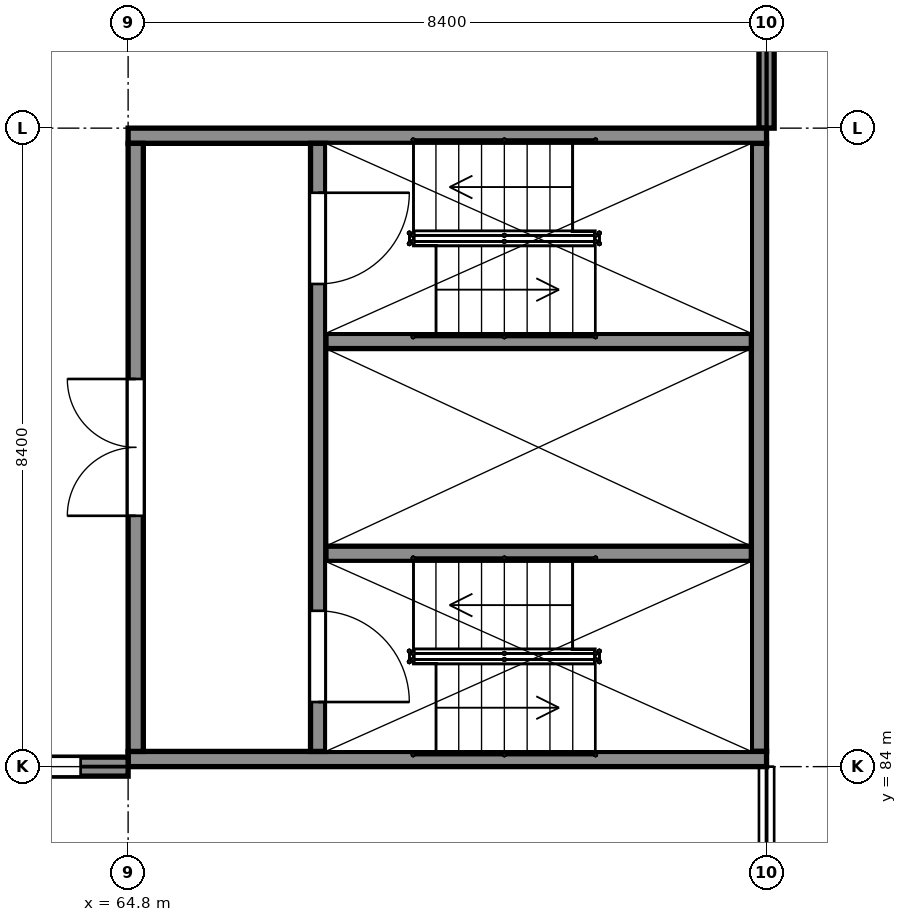
"""IFC4 building model, lengths in metres.
Left out: names, types, materials, properties, quantities, classifications, styles, units other than length and angle.
Written with IfcOpenShell. Run it as: python <this file> out.ifc"""

import sys

from ifc_helpers import new_model, si_unit, direction, frame, frame_2d, origin, place, context, subcontext, project, spatial, rectangle, extrude, element, fill, save


model = new_model("IFC4")
c1 = context("Model", 3, precision=1e-05, world=origin(), true_north=direction((0.0, 1.0)))
c2 = subcontext(c1, "Body", "Model", "MODEL_VIEW")
j1 = project(units=[si_unit("LENGTHUNIT", "METRE"), si_unit("PLANEANGLEUNIT", "RADIAN")], contexts=[c1])
p1 = place(None, origin())
s1 = spatial("IfcSite", under=j1, at=p1, CompositionType="ELEMENT")
p2 = place(p1, origin())
s2 = spatial("IfcBuilding", under=s1, at=p2, CompositionType="ELEMENT")
p3 = place(p2, frame((0.0, 0.0, 10.5)))
s3 = spatial("IfcBuildingStorey", under=s2, at=p3, CompositionType="ELEMENT", Elevation=10.5)
for number, where, z_axis, x_axis in (
    (1, (64.8, 84.1, 0.0), (0.0, 0.0, 1.0), (1.0, 0.0, 0.0)),
    (2, (64.8, 92.3, 0.0), (0.0, 0.0, 1.0), (1.0, 0.0, 0.0)),
):
    element("IfcWall", number, at=place(p3, frame(where, z_axis=z_axis, x_axis=x_axis)), inside=s3, PredefinedType="SHEAR", context=c2, shape_type="SweptSolid", body=[
        extrude(rectangle(XDim=8.4, YDim=0.2, at=frame_2d((4.2, 0.0))), origin(), (0.0, 0.0, 1.0), 9.5),
    ])
p4 = place(p3, frame((64.9, 84.2, 0.0), z_axis=(0.0, 0.0, 1.0), x_axis=(0.0, 1.0, 0.0)))
e3 = element("IfcWall", 3, at=p4, inside=s3, PredefinedType="SHEAR", context=c2, shape_type="SweptSolid", body=[
    extrude(rectangle(XDim=8.0, YDim=0.2, at=frame_2d((4.0, 0.0))), origin(), (0.0, 0.0, 1.0), 9.5),
])
p5 = place(p4, frame((3.1, 0.0, 0.0)))
e4 = element("IfcOpeningElement", 4, at=p5, cuts=e3, PredefinedType="OPENING", context=c2, shape_type="SweptSolid", body=[
    extrude(rectangle(XDim=1.8, YDim=2.1, at=frame_2d((0.9, 1.05))), frame((0.0, 0.11, 0.0), z_axis=(0.0, -1.0, 0.0), x_axis=(1.0, 0.0, 0.0)), (0.0, 0.0, 1.0), 0.22),
])
p6 = place(p3, frame((73.1, 84.2, 0.0), z_axis=(0.0, 0.0, 1.0), x_axis=(0.0, 1.0, 0.0)))
e5 = element("IfcWall", 5, at=p6, inside=s3, PredefinedType="SHEAR", context=c2, shape_type="SweptSolid", body=[
    extrude(rectangle(XDim=8.0, YDim=0.2, at=frame_2d((4.0, 0.0))), origin(), (0.0, 0.0, 1.0), 9.5),
])
p7 = place(p3, frame((67.3, 84.2, 0.0), z_axis=(0.0, 0.0, 1.0), x_axis=(0.0, 1.0, 0.0)))
e6 = element("IfcWall", 6, at=p7, inside=s3, PredefinedType="SHEAR", context=c2, shape_type="SweptSolid", body=[
    extrude(rectangle(XDim=8.0, YDim=0.2, at=frame_2d((4.0, 0.0))), origin(), (0.0, 0.0, 1.0), 9.5),
])
p8 = place(p7, frame((0.65, 0.0, 0.0)))
e7 = element("IfcOpeningElement", 7, at=p8, cuts=e6, PredefinedType="OPENING", context=c2, shape_type="SweptSolid", body=[
    extrude(rectangle(XDim=1.2, YDim=2.1, at=frame_2d((0.6, 1.05))), frame((0.0, 0.11, 0.0), z_axis=(0.0, -1.0, 0.0), x_axis=(1.0, 0.0, 0.0)), (0.0, 0.0, 1.0), 0.22),
])
p9 = place(p7, frame((6.15, 0.0, 0.0)))
e8 = element("IfcOpeningElement", 8, at=p9, cuts=e6, PredefinedType="OPENING", context=c2, shape_type="SweptSolid", body=[
    extrude(rectangle(XDim=1.2, YDim=2.1, at=frame_2d((0.6, 1.05))), frame((0.0, 0.11, 0.0), z_axis=(0.0, -1.0, 0.0), x_axis=(1.0, 0.0, 0.0)), (0.0, 0.0, 1.0), 0.22),
])
for number, where, z_axis, x_axis in (
    (9, (67.4, 86.8, 0.0), (0.0, 0.0, 1.0), (1.0, 0.0, 0.0)),
    (10, (67.4, 89.6, 0.0), (0.0, 0.0, 1.0), (1.0, 0.0, 0.0)),
):
    element("IfcWall", number, at=place(p3, frame(where, z_axis=z_axis, x_axis=x_axis)), inside=s3, PredefinedType="SHEAR", context=c2, shape_type="SweptSolid", body=[
        extrude(rectangle(XDim=5.6, YDim=0.2, at=frame_2d((2.8, 0.0))), origin(), (0.0, 0.0, 1.0), 9.5),
    ])
p10 = place(p3, frame((56.75, 84.0, 0.0), z_axis=(0.0, 0.0, 1.0), x_axis=(1.0, 0.0, 0.0)))
e11 = element("IfcWall", 11, at=p10, inside=s3, PredefinedType="SOLIDWALL", context=c2, shape_type="SweptSolid", body=[
    extrude(rectangle(XDim=8.05, YDim=0.25, at=frame_2d((4.025, 0.0))), origin(), (0.0, 0.0, 1.0), 8.44),
])
p11 = place(p10, frame((0.625, 0.0, 0.9)))
e12 = element("IfcOpeningElement", 12, at=p11, cuts=e11, PredefinedType="OPENING", context=c2, shape_type="SweptSolid", body=[
    extrude(rectangle(XDim=1.2, YDim=6.0, at=frame_2d((0.6, 3.0))), frame((0.0, 0.135, 0.0), z_axis=(0.0, -1.0, 0.0), x_axis=(1.0, 0.0, 0.0)), (0.0, 0.0, 1.0), 0.27),
])
p12 = place(p10, frame((3.425, 0.0, 0.9)))
e13 = element("IfcOpeningElement", 13, at=p12, cuts=e11, PredefinedType="OPENING", context=c2, shape_type="SweptSolid", body=[
    extrude(rectangle(XDim=1.2, YDim=6.0, at=frame_2d((0.6, 3.0))), frame((0.0, 0.135, 0.0), z_axis=(0.0, -1.0, 0.0), x_axis=(1.0, 0.0, 0.0)), (0.0, 0.0, 1.0), 0.27),
])
p13 = place(p10, frame((6.225, 0.0, 0.9)))
e14 = element("IfcOpeningElement", 14, at=p13, cuts=e11, PredefinedType="OPENING", context=c2, shape_type="SweptSolid", body=[
    extrude(rectangle(XDim=1.2, YDim=6.0, at=frame_2d((0.6, 3.0))), frame((0.0, 0.135, 0.0), z_axis=(0.0, -1.0, 0.0), x_axis=(1.0, 0.0, 0.0)), (0.0, 0.0, 1.0), 0.27),
])
p14 = place(p3, frame((73.2, 92.4, 0.0), z_axis=(0.0, 0.0, 1.0), x_axis=(0.0, 1.0, 0.0)))
e15 = element("IfcWall", 15, at=p14, inside=s3, PredefinedType="PARTITIONING", context=c2, shape_type="SweptSolid", body=[
    extrude(rectangle(XDim=8.4, YDim=0.2, at=frame_2d((4.2, 0.0))), origin(), (0.0, 0.0, 1.0), 7.96),
])
p15 = place(p14, frame((5.75, 0.0, 0.0)))
e16 = element("IfcOpeningElement", 16, at=p15, cuts=e15, PredefinedType="OPENING", context=c2, shape_type="SweptSolid", body=[
    extrude(rectangle(XDim=2.4, YDim=2.4, at=frame_2d((1.2, 1.2))), frame((0.0, 0.11, 0.0), z_axis=(0.0, -1.0, 0.0), x_axis=(1.0, 0.0, 0.0)), (0.0, 0.0, 1.0), 0.22),
])
p16 = place(p13, origin())
e17 = element("IfcWindow", 17, at=p16, inside=s3, PartitioningType="SINGLE_PANEL", PredefinedType="WINDOW", context=c2, shape_type="SweptSolid", body=[
    extrude(rectangle(XDim=1.2, YDim=6.0, at=frame_2d((0.6, 3.0))), frame((0.0, 0.105, 0.0), z_axis=(0.0, -1.0, 0.0), x_axis=(1.0, 0.0, 0.0)), (0.0, 0.0, 1.0), 0.06),
])
fill(e14, e17)
p17 = place(p5, origin())
e18 = element("IfcDoor", 18, at=p17, inside=s3, OperationType="DOUBLE_DOOR_SINGLE_SWING", PredefinedType="DOOR", context=c2, shape_type="SweptSolid", body=[
    extrude(rectangle(XDim=1.8, YDim=2.1, at=frame_2d((0.9, 1.05))), frame((0.0, 0.025, 0.0), z_axis=(0.0, -1.0, 0.0), x_axis=(1.0, 0.0, 0.0)), (0.0, 0.0, 1.0), 0.05),
])
fill(e4, e18)
p18 = place(p8, origin())
e19 = element("IfcDoor", 19, at=p18, inside=s3, OperationType="SINGLE_SWING_LEFT", PredefinedType="DOOR", context=c2, shape_type="SweptSolid", body=[
    extrude(rectangle(XDim=1.2, YDim=2.1, at=frame_2d((0.6, 1.05))), frame((0.0, 0.025, 0.0), z_axis=(0.0, -1.0, 0.0), x_axis=(1.0, 0.0, 0.0)), (0.0, 0.0, 1.0), 0.05),
])
fill(e7, e19)
p19 = place(p9, origin())
e20 = element("IfcDoor", 20, at=p19, inside=s3, OperationType="SINGLE_SWING_RIGHT", PredefinedType="DOOR", context=c2, shape_type="SweptSolid", body=[
    extrude(rectangle(XDim=1.2, YDim=2.1, at=frame_2d((0.6, 1.05))), frame((0.0, 0.025, 0.0), z_axis=(0.0, -1.0, 0.0), x_axis=(1.0, 0.0, 0.0)), (0.0, 0.0, 1.0), 0.05),
])
fill(e8, e20)
save(model, sys.argv[1])
